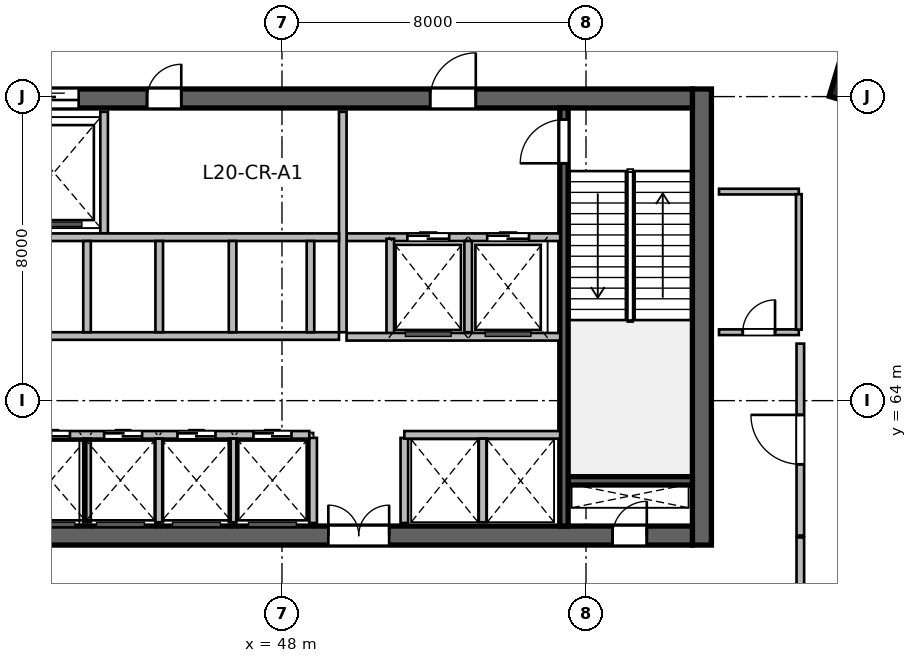
"""IFC4 building model, lengths in metres.
Left out: names, types, materials, properties, quantities, classifications, styles, units other than length and angle.
Written with IfcOpenShell. Run it as: python <this file> out.ifc"""

import sys

from ifc_helpers import new_model, si_unit, direction, frame, frame_2d, origin, origin_2d, place, context, subcontext, project, spatial, rectangle, extrude, source, transform, mapped, element, fill, save


model = new_model("IFC4")
c1 = context("Model", 3, precision=1e-05, world=origin(), true_north=direction((0.0, 1.0)))
c2 = subcontext(c1, "Body", "Model", "MODEL_VIEW")
j1 = project(units=[si_unit("LENGTHUNIT", "METRE"), si_unit("PLANEANGLEUNIT", "RADIAN")], contexts=[c1])
p1 = place(None, origin())
s1 = spatial("IfcSite", under=j1, at=p1, CompositionType="ELEMENT")
p2 = place(p1, origin())
s2 = spatial("IfcBuilding", under=s1, at=p2, CompositionType="ELEMENT")
p3 = place(p2, frame((0.0, 0.0, 85.8)))
s3 = spatial("IfcBuildingStorey", under=s2, at=p3, CompositionType="ELEMENT", Elevation=85.8)
m1 = source(origin(), c2, "Body", "SweptSolid", [
    extrude(rectangle(XDim=12.0, YDim=0.5, at=frame_2d((6.0, 0.0))), origin(), (0.0, 0.0, 1.0), 5.4),
])
p4 = place(p3, frame((59.05, 60.2, 0.0), z_axis=(0.0, 0.0, 1.0), x_axis=(0.0, 1.0, 0.0)))
e1 = element("IfcWall", 1, at=p4, inside=s3, PredefinedType="SHEAR", context=c2, shape_type="MappedRepresentation", body=[
    mapped(m1, transform((0.0, 0.0, 0.0), scale=1.0)),
])
m2 = source(origin(), c2, "Body", "SweptSolid", [
    extrude(rectangle(XDim=21.6, YDim=0.5, at=frame_2d((10.8, 0.0))), origin(), (0.0, 0.0, 1.0), 5.4),
])
p5 = place(p3, frame((37.2, 60.45, 0.0), z_axis=(0.0, 0.0, 1.0), x_axis=(1.0, 0.0, 0.0)))
e2 = element("IfcWall", 2, at=p5, inside=s3, PredefinedType="SHEAR", context=c2, shape_type="MappedRepresentation", body=[
    mapped(m2, transform((0.0, 0.0, 0.0), scale=1.0)),
])
p6 = place(p5, frame((1.1, 0.0, 0.0)))
e3 = element("IfcOpeningElement", 3, at=p6, cuts=e2, PredefinedType="OPENING", context=c2, shape_type="SweptSolid", body=[
    extrude(rectangle(XDim=1.15, YDim=2.15, at=frame_2d((0.575, 1.075))), frame((0.0, 0.26, 0.0), z_axis=(0.0, -1.0, 0.0), x_axis=(1.0, 0.0, 0.0)), (0.0, 0.0, 1.0), 0.52),
])
p7 = place(p5, frame((19.5, 0.0, 0.0)))
e4 = element("IfcOpeningElement", 4, at=p7, cuts=e2, PredefinedType="OPENING", context=c2, shape_type="SweptSolid", body=[
    extrude(rectangle(XDim=0.9, YDim=2.1, at=frame_2d((0.45, 1.05))), frame((0.0, 0.26, 0.0), z_axis=(0.0, -1.0, 0.0), x_axis=(1.0, 0.0, 0.0)), (0.0, 0.0, 1.0), 0.52),
])
p8 = place(p5, frame((12.02, 0.0, 0.0)))
e5 = element("IfcOpeningElement", 5, at=p8, cuts=e2, PredefinedType="OPENING", context=c2, shape_type="SweptSolid", body=[
    extrude(rectangle(XDim=1.6, YDim=2.15, at=frame_2d((0.8, 1.075))), frame((0.0, 0.26, 0.0), z_axis=(0.0, -1.0, 0.0), x_axis=(1.0, 0.0, 0.0)), (0.0, 0.0, 1.0), 0.52),
])
p9 = place(p3, frame((37.2, 71.95, 0.0), z_axis=(0.0, 0.0, 1.0), x_axis=(1.0, 0.0, 0.0)))
e6 = element("IfcWall", 6, at=p9, inside=s3, PredefinedType="SHEAR", context=c2, shape_type="MappedRepresentation", body=[
    mapped(m2, transform((0.0, 0.0, 0.0), scale=1.0)),
])
p10 = place(p9, frame((1.2, 0.0, 0.0)))
e7 = element("IfcOpeningElement", 7, at=p10, cuts=e6, PredefinedType="OPENING", context=c2, shape_type="SweptSolid", body=[
    extrude(rectangle(XDim=0.9, YDim=2.1, at=frame_2d((0.45, 1.05))), frame((0.0, 0.26, 0.0), z_axis=(0.0, -1.0, 0.0), x_axis=(1.0, 0.0, 0.0)), (0.0, 0.0, 1.0), 0.52),
])
p11 = place(p9, frame((14.7, 0.0, 0.0)))
e8 = element("IfcOpeningElement", 8, at=p11, cuts=e6, PredefinedType="OPENING", context=c2, shape_type="SweptSolid", body=[
    extrude(rectangle(XDim=1.2, YDim=2.15, at=frame_2d((0.6, 1.075))), frame((0.0, 0.26, 0.0), z_axis=(0.0, -1.0, 0.0), x_axis=(1.0, 0.0, 0.0)), (0.0, 0.0, 1.0), 0.52),
])
p12 = place(p9, frame((4.15, 0.0, 0.0)))
e9 = element("IfcOpeningElement", 9, at=p12, cuts=e6, PredefinedType="OPENING", context=c2, shape_type="SweptSolid", body=[
    extrude(rectangle(XDim=1.3, YDim=2.15, at=frame_2d((0.65, 1.075))), frame((0.0, 0.26, 0.0), z_axis=(0.0, -1.0, 0.0), x_axis=(1.0, 0.0, 0.0)), (0.0, 0.0, 1.0), 0.52),
])
p13 = place(p9, frame((7.25, 0.0, 0.0)))
e10 = element("IfcOpeningElement", 10, at=p13, cuts=e6, PredefinedType="OPENING", context=c2, shape_type="SweptSolid", body=[
    extrude(rectangle(XDim=0.9, YDim=2.1, at=frame_2d((0.45, 1.05))), frame((0.0, 0.26, 0.0), z_axis=(0.0, -1.0, 0.0), x_axis=(1.0, 0.0, 0.0)), (0.0, 0.0, 1.0), 0.52),
])
m3 = source(origin(), c2, "Body", "SweptSolid", [
    extrude(rectangle(XDim=3.27, YDim=0.22, at=frame_2d((1.635, 0.0))), origin(), (0.0, 0.0, 1.0), 5.4),
])
p14 = place(p3, frame((55.53, 61.89, 0.0), z_axis=(0.0, 0.0, 1.0), x_axis=(1.0, 0.0, 0.0)))
e11 = element("IfcWall", 11, at=p14, inside=s3, PredefinedType="SHEAR", context=c2, shape_type="MappedRepresentation", body=[
    mapped(m3, transform((0.0, 0.0, 0.0), scale=1.0)),
])
m4 = source(origin(), c2, "Body", "SweptSolid", [
    extrude(rectangle(XDim=11.0, YDim=0.22, at=frame_2d((5.5, 0.0))), origin(), (0.0, 0.0, 1.0), 5.4),
])
p15 = place(p3, frame((55.42, 60.7, 0.0), z_axis=(0.0, 0.0, 1.0), x_axis=(0.0, 1.0, 0.0)))
e12 = element("IfcWall", 12, at=p15, inside=s3, PredefinedType="SHEAR", context=c2, shape_type="MappedRepresentation", body=[
    mapped(m4, transform((0.0, 0.0, 0.0), scale=1.0)),
])
p16 = place(p15, frame((9.545, 0.0, 0.0)))
e13 = element("IfcOpeningElement", 13, at=p16, cuts=e12, PredefinedType="OPENING", context=c2, shape_type="SweptSolid", body=[
    extrude(rectangle(XDim=1.15, YDim=2.15, at=frame_2d((0.575, 1.075))), frame((0.0, 0.12, 0.0), z_axis=(0.0, -1.0, 0.0), x_axis=(1.0, 0.0, 0.0)), (0.0, 0.0, 1.0), 0.24),
])
m5 = source(origin(), c2, "Body", "SweptSolid", [
    extrude(rectangle(XDim=1.3, YDim=1.3, at=origin_2d()), origin(), (0.0, 0.0, 1.0), 5.4),
])
p17 = place(p3, frame((63.209, 72.442, 0.0), z_axis=(0.0, 0.0, 1.0), x_axis=(0.288697611798, 0.957420330337, 0.0)))
e14 = element("IfcColumn", 14, at=p17, inside=s3, PredefinedType="COLUMN", context=c2, shape_type="MappedRepresentation", body=[
    mapped(m5, transform((0.0, 0.0, 0.0), scale=1.0)),
])
m6 = source(origin(), c2, "Body", "SweptSolid", [
    extrude(rectangle(XDim=2.24, YDim=0.2, at=frame_2d((1.12, 0.0))), origin(), (0.0, 0.0, 1.0), 5.15),
])
for number, where, z_axis, x_axis in (
    (15, (48.82, 60.78, 0.0), (0.0, 0.0, 1.0), (0.0, 1.0, 0.0)),
    (16, (51.22, 60.78, 0.0), (0.0, 0.0, 1.0), (0.0, 1.0, 0.0)),
):
    element("IfcWall", number, at=place(p3, frame(where, z_axis=z_axis, x_axis=x_axis)), inside=s3, PredefinedType="SOLIDWALL", context=c2, shape_type="MappedRepresentation", body=[
        mapped(m6, transform((0.0, 0.0, 0.0), scale=1.0)),
    ])
m7 = source(origin(), c2, "Body", "SweptSolid", [
    extrude(rectangle(XDim=5.62, YDim=0.2, at=frame_2d((2.81, 0.0))), origin(), (0.0, 0.0, 1.0), 5.15),
])
p18 = place(p3, frame((49.7, 68.3, 0.0), z_axis=(0.0, 0.0, 1.0), x_axis=(1.0, 0.0, 0.0)))
e17 = element("IfcWall", 17, at=p18, inside=s3, PredefinedType="SOLIDWALL", context=c2, shape_type="MappedRepresentation", body=[
    mapped(m7, transform((0.0, 0.0, 0.0), scale=1.0)),
])
p19 = place(p18, frame((1.6, 0.0, 0.0)))
e18 = element("IfcOpeningElement", 18, at=p19, cuts=e17, PredefinedType="OPENING", context=c2, shape_type="SweptSolid", body=[
    extrude(rectangle(XDim=1.1, YDim=2.15, at=frame_2d((0.55, 1.075))), frame((0.0, 0.11, 0.0), z_axis=(0.0, -1.0, 0.0), x_axis=(1.0, 0.0, 0.0)), (0.0, 0.0, 1.0), 0.22),
])
p20 = place(p18, frame((3.7, 0.0, 0.0)))
e19 = element("IfcOpeningElement", 19, at=p20, cuts=e17, PredefinedType="OPENING", context=c2, shape_type="SweptSolid", body=[
    extrude(rectangle(XDim=1.1, YDim=2.15, at=frame_2d((0.55, 1.075))), frame((0.0, 0.11, 0.0), z_axis=(0.0, -1.0, 0.0), x_axis=(1.0, 0.0, 0.0)), (0.0, 0.0, 1.0), 0.22),
])
m8 = source(origin(), c2, "Body", "SweptSolid", [
    extrude(rectangle(XDim=5.8, YDim=0.2, at=frame_2d((2.9, 0.0))), origin(), (0.0, 0.0, 1.0), 5.15),
])
p21 = place(p3, frame((49.6, 65.8, 0.0), z_axis=(0.0, 0.0, 1.0), x_axis=(0.0, 1.0, 0.0)))
e20 = element("IfcWall", 20, at=p21, inside=s3, PredefinedType="SOLIDWALL", context=c2, shape_type="MappedRepresentation", body=[
    mapped(m8, transform((0.0, 0.0, 0.0), scale=1.0)),
])
m9 = source(origin(), c2, "Body", "SweptSolid", [
    extrude(rectangle(XDim=2.58, YDim=0.2, at=frame_2d((1.29, 0.0))), origin(), (0.0, 0.0, 1.0), 5.15),
])
p22 = place(p3, frame((50.85, 65.68, 0.0), z_axis=(0.0, 0.0, 1.0), x_axis=(0.0, 1.0, 0.0)))
e21 = element("IfcWall", 21, at=p22, inside=s3, PredefinedType="SOLIDWALL", context=c2, shape_type="MappedRepresentation", body=[
    mapped(m9, transform((0.0, 0.0, 0.0), scale=1.0)),
])
m10 = source(origin(), c2, "Body", "SweptSolid", [
    extrude(rectangle(XDim=2.4, YDim=0.2, at=frame_2d((1.2, 0.0))), origin(), (0.0, 0.0, 1.0), 5.15),
])
p23 = place(p3, frame((52.9, 65.8, 0.0), z_axis=(0.0, 0.0, 1.0), x_axis=(0.0, 1.0, 0.0)))
e22 = element("IfcWall", 22, at=p23, inside=s3, PredefinedType="SOLIDWALL", context=c2, shape_type="MappedRepresentation", body=[
    mapped(m10, transform((0.0, 0.0, 0.0), scale=1.0)),
])
p24 = place(p3, frame((49.7, 65.68, 0.0), z_axis=(0.0, 0.0, 1.0), x_axis=(1.0, 0.0, 0.0)))
e23 = element("IfcWall", 23, at=p24, inside=s3, PredefinedType="SOLIDWALL", context=c2, shape_type="MappedRepresentation", body=[
    mapped(m7, transform((0.0, 0.0, 0.0), scale=1.0)),
])
m11 = source(origin(), c2, "Body", "SweptSolid", [
    extrude(rectangle(XDim=3.2, YDim=0.2, at=frame_2d((1.6, 0.0))), origin(), (0.0, 0.0, 1.0), 5.15),
])
p25 = place(p3, frame((43.32, 68.4, 0.0), z_axis=(0.0, 0.0, 1.0), x_axis=(0.0, 1.0, 0.0)))
e24 = element("IfcWall", 24, at=p25, inside=s3, PredefinedType="SOLIDWALL", context=c2, shape_type="MappedRepresentation", body=[
    mapped(m11, transform((0.0, 0.0, 0.0), scale=1.0)),
])
m12 = source(origin(), c2, "Body", "SweptSolid", [
    extrude(rectangle(XDim=8.8, YDim=0.2, at=frame_2d((4.4, 0.0))), origin(), (0.0, 0.0, 1.0), 5.15),
])
p26 = place(p3, frame((40.7, 68.3, 0.0), z_axis=(0.0, 0.0, 1.0), x_axis=(1.0, 0.0, 0.0)))
e25 = element("IfcWall", 25, at=p26, inside=s3, PredefinedType="SOLIDWALL", context=c2, shape_type="MappedRepresentation", body=[
    mapped(m12, transform((0.0, 0.0, 0.0), scale=1.0)),
])
m13 = source(origin(), c2, "Body", "SweptSolid", [
    extrude(rectangle(XDim=8.02, YDim=0.2, at=frame_2d((4.01, 0.0))), origin(), (0.0, 0.0, 1.0), 5.15),
])
p27 = place(p3, frame((40.7, 63.1, 0.0), z_axis=(0.0, 0.0, 1.0), x_axis=(1.0, 0.0, 0.0)))
e26 = element("IfcWall", 26, at=p27, inside=s3, PredefinedType="SOLIDWALL", context=c2, shape_type="MappedRepresentation", body=[
    mapped(m13, transform((0.0, 0.0, 0.0), scale=1.0)),
])
p28 = place(p27, frame((0.72, 0.0, 0.0)))
e27 = element("IfcOpeningElement", 27, at=p28, cuts=e26, PredefinedType="OPENING", context=c2, shape_type="SweptSolid", body=[
    extrude(rectangle(XDim=1.0, YDim=2.15, at=frame_2d((0.5, 1.075))), frame((0.0, 0.11, 0.0), z_axis=(0.0, -1.0, 0.0), x_axis=(1.0, 0.0, 0.0)), (0.0, 0.0, 1.0), 0.22),
])
p29 = place(p27, frame((2.62, 0.0, 0.0)))
e28 = element("IfcOpeningElement", 28, at=p29, cuts=e26, PredefinedType="OPENING", context=c2, shape_type="SweptSolid", body=[
    extrude(rectangle(XDim=1.0, YDim=2.15, at=frame_2d((0.5, 1.075))), frame((0.0, 0.11, 0.0), z_axis=(0.0, -1.0, 0.0), x_axis=(1.0, 0.0, 0.0)), (0.0, 0.0, 1.0), 0.22),
])
p30 = place(p27, frame((4.55, 0.0, 0.0)))
e29 = element("IfcOpeningElement", 29, at=p30, cuts=e26, PredefinedType="OPENING", context=c2, shape_type="SweptSolid", body=[
    extrude(rectangle(XDim=1.0, YDim=2.15, at=frame_2d((0.5, 1.075))), frame((0.0, 0.11, 0.0), z_axis=(0.0, -1.0, 0.0), x_axis=(1.0, 0.0, 0.0)), (0.0, 0.0, 1.0), 0.22),
])
p31 = place(p27, frame((6.55, 0.0, 0.0)))
e30 = element("IfcOpeningElement", 30, at=p31, cuts=e26, PredefinedType="OPENING", context=c2, shape_type="SweptSolid", body=[
    extrude(rectangle(XDim=1.0, YDim=2.15, at=frame_2d((0.5, 1.075))), frame((0.0, 0.11, 0.0), z_axis=(0.0, -1.0, 0.0), x_axis=(1.0, 0.0, 0.0)), (0.0, 0.0, 1.0), 0.22),
])
m14 = source(origin(), c2, "Body", "SweptSolid", [
    extrude(rectangle(XDim=4.1, YDim=0.2, at=frame_2d((2.05, 0.0))), origin(), (0.0, 0.0, 1.0), 5.15),
])
p32 = place(p3, frame((51.22, 63.1, 0.0), z_axis=(0.0, 0.0, 1.0), x_axis=(1.0, 0.0, 0.0)))
e31 = element("IfcWall", 31, at=p32, inside=s3, PredefinedType="SOLIDWALL", context=c2, shape_type="MappedRepresentation", body=[
    mapped(m14, transform((0.0, 0.0, 0.0), scale=1.0)),
])
m15 = source(origin(), c2, "Body", "SweptSolid", [
    extrude(rectangle(XDim=2.2, YDim=0.2, at=frame_2d((1.1, 0.0))), origin(), (0.0, 0.0, 1.0), 5.15),
])
for number, where, z_axis, x_axis in (
    (32, (42.87, 60.8, 0.0), (0.0, 0.0, 1.0), (0.0, 1.0, 0.0)),
    (33, (44.77, 60.8, 0.0), (0.0, 0.0, 1.0), (0.0, 1.0, 0.0)),
    (34, (46.7, 60.8, 0.0), (0.0, 0.0, 1.0), (0.0, 1.0, 0.0)),
    (35, (53.28, 60.8, 0.0), (0.0, 0.0, 1.0), (0.0, 1.0, 0.0)),
):
    element("IfcWall", number, at=place(p3, frame(where, z_axis=z_axis, x_axis=x_axis)), inside=s3, PredefinedType="SOLIDWALL", context=c2, shape_type="MappedRepresentation", body=[
        mapped(m15, transform((0.0, 0.0, 0.0), scale=1.0)),
    ])
p33 = place(p3, frame((40.7, 65.7, 0.0), z_axis=(0.0, 0.0, 1.0), x_axis=(1.0, 0.0, 0.0)))
e36 = element("IfcWall", 36, at=p33, inside=s3, PredefinedType="SOLIDWALL", context=c2, shape_type="MappedRepresentation", body=[
    mapped(m12, transform((0.0, 0.0, 0.0), scale=1.0)),
])
for number, where, z_axis, x_axis in (
    (37, (48.75, 65.8, 0.0), (0.0, 0.0, 1.0), (0.0, 1.0, 0.0)),
    (38, (42.87, 65.8, 0.0), (0.0, 0.0, 1.0), (0.0, 1.0, 0.0)),
    (39, (44.77, 65.8, 0.0), (0.0, 0.0, 1.0), (0.0, 1.0, 0.0)),
    (40, (46.7, 65.8, 0.0), (0.0, 0.0, 1.0), (0.0, 1.0, 0.0)),
):
    element("IfcWall", number, at=place(p3, frame(where, z_axis=z_axis, x_axis=x_axis)), inside=s3, PredefinedType="SOLIDWALL", context=c2, shape_type="MappedRepresentation", body=[
        mapped(m10, transform((0.0, 0.0, 0.0), scale=1.0)),
    ])
m16 = source(origin(), c2, "Body", "SweptSolid", [
    extrude(rectangle(XDim=2.1, YDim=0.15, at=frame_2d((1.05, 0.0))), origin(), (0.0, 0.0, 1.0), 5.15),
])
p34 = place(p3, frame((59.5, 65.8, 0.0), z_axis=(0.0, 0.0, 1.0), x_axis=(1.0, 0.0, 0.0)))
e41 = element("IfcWall", 41, at=p34, inside=s3, PredefinedType="PARTITIONING", context=c2, shape_type="MappedRepresentation", body=[
    mapped(m16, transform((0.0, 0.0, 0.0), scale=1.0)),
])
p35 = place(p34, frame((0.625, 0.0, 0.0)))
e42 = element("IfcOpeningElement", 42, at=p35, cuts=e41, PredefinedType="OPENING", context=c2, shape_type="SweptSolid", body=[
    extrude(rectangle(XDim=0.85, YDim=2.1, at=frame_2d((0.425, 1.05))), frame((0.0, 0.085, 0.0), z_axis=(0.0, -1.0, 0.0), x_axis=(1.0, 0.0, 0.0)), (0.0, 0.0, 1.0), 0.17),
])
p36 = place(p3, frame((59.5, 69.5, 0.0), z_axis=(0.0, 0.0, 1.0), x_axis=(1.0, 0.0, 0.0)))
e43 = element("IfcWall", 43, at=p36, inside=s3, PredefinedType="PARTITIONING", context=c2, shape_type="MappedRepresentation", body=[
    mapped(m16, transform((0.0, 0.0, 0.0), scale=1.0)),
])
m17 = source(origin(), c2, "Body", "SweptSolid", [
    extrude(rectangle(XDim=3.565, YDim=0.15, at=frame_2d((1.783, 0.0))), origin(), (0.0, 0.0, 1.0), 5.15),
])
p37 = place(p3, frame((61.6, 65.867, 0.0), z_axis=(0.0, 0.0, 1.0), x_axis=(0.0, 1.0, 0.0)))
e44 = element("IfcWall", 44, at=p37, inside=s3, PredefinedType="PARTITIONING", context=c2, shape_type="MappedRepresentation", body=[
    mapped(m17, transform((0.0, 0.0, 0.0), scale=1.0)),
])
m18 = source(origin(), c2, "Body", "SweptSolid", [
    extrude(rectangle(XDim=13.689, YDim=0.2, at=frame_2d((6.844, 0.0))), origin(), (0.0, 0.0, 1.0), 4.434),
])
p38 = place(p3, frame((61.64, 46.711, 0.0), z_axis=(0.0, 0.0, 1.0), x_axis=(0.0, 1.0, 0.0)))
e45 = element("IfcWall", 45, at=p38, inside=s3, PredefinedType="SOLIDWALL", context=c2, shape_type="MappedRepresentation", body=[
    mapped(m18, transform((0.0, 0.0, 0.0), scale=1.0)),
])
m19 = source(origin(), c2, "Body", "SweptSolid", [
    extrude(rectangle(XDim=5.05, YDim=0.2, at=frame_2d((2.525, 0.0))), origin(), (0.0, 0.0, 1.0), 5.15),
])
p39 = place(p3, frame((61.64, 60.45, 0.0), z_axis=(0.0, 0.0, 1.0), x_axis=(0.0, 1.0, 0.0)))
e46 = element("IfcWall", 46, at=p39, inside=s3, PredefinedType="SOLIDWALL", context=c2, shape_type="MappedRepresentation", body=[
    mapped(m19, transform((0.0, 0.0, 0.0), scale=1.0)),
])
p40 = place(p39, frame((1.875, 0.0, 0.0)))
e47 = element("IfcOpeningElement", 47, at=p40, cuts=e46, PredefinedType="OPENING", context=c2, shape_type="SweptSolid", body=[
    extrude(rectangle(XDim=1.3, YDim=2.15, at=frame_2d((0.65, 1.075))), frame((0.0, 0.11, 0.0), z_axis=(0.0, -1.0, 0.0), x_axis=(1.0, 0.0, 0.0)), (0.0, 0.0, 1.0), 0.22),
])
m20 = source(origin(), c2, "Body", "SweptSolid", [
    extrude(rectangle(XDim=0.9, YDim=2.1, at=frame_2d((0.45, 1.05))), frame((0.0, 0.025, 0.0), z_axis=(0.0, -1.0, 0.0), x_axis=(1.0, 0.0, 0.0)), (0.0, 0.0, 1.0), 0.05),
])
p41 = place(p7, origin())
e48 = element("IfcDoor", 48, at=p41, inside=s3, OperationType="SINGLE_SWING_RIGHT", PredefinedType="DOOR", context=c2, shape_type="MappedRepresentation", body=[
    mapped(m20, transform((0.0, 0.0, 0.0), scale=1.0)),
])
fill(e4, e48)
m21 = source(origin(), c2, "Body", "SweptSolid", [
    extrude(rectangle(XDim=1.15, YDim=2.15, at=frame_2d((0.575, 1.075))), frame((0.0, 0.025, 0.0), z_axis=(0.0, -1.0, 0.0), x_axis=(1.0, 0.0, 0.0)), (0.0, 0.0, 1.0), 0.05),
])
p42 = place(p16, origin())
e49 = element("IfcDoor", 49, at=p42, inside=s3, OperationType="SINGLE_SWING_LEFT", PredefinedType="DOOR", context=c2, shape_type="MappedRepresentation", body=[
    mapped(m21, transform((0.0, 0.0, 0.0), scale=1.0)),
])
fill(e13, e49)
m22 = source(origin(), c2, "Body", "SweptSolid", [
    extrude(rectangle(XDim=1.6, YDim=2.15, at=frame_2d((0.8, 1.075))), frame((0.0, 0.025, 0.0), z_axis=(0.0, -1.0, 0.0), x_axis=(1.0, 0.0, 0.0)), (0.0, 0.0, 1.0), 0.05),
])
p43 = place(p8, origin())
e50 = element("IfcDoor", 50, at=p43, inside=s3, OperationType="DOUBLE_DOOR_SINGLE_SWING", PredefinedType="DOOR", context=c2, shape_type="MappedRepresentation", body=[
    mapped(m22, transform((0.0, 0.0, 0.0), scale=1.0)),
])
fill(e5, e50)
m23 = source(origin(), c2, "Body", "SweptSolid", [
    extrude(rectangle(XDim=1.2, YDim=2.15, at=frame_2d((0.6, 1.075))), frame((0.0, 0.025, 0.0), z_axis=(0.0, -1.0, 0.0), x_axis=(1.0, 0.0, 0.0)), (0.0, 0.0, 1.0), 0.05),
])
p44 = place(p11, origin())
e51 = element("IfcDoor", 51, at=p44, inside=s3, OperationType="SINGLE_SWING_RIGHT", PredefinedType="DOOR", context=c2, shape_type="MappedRepresentation", body=[
    mapped(m23, transform((0.0, 0.0, 0.0), scale=1.0)),
])
fill(e8, e51)
m24 = source(origin(), c2, "Body", "SweptSolid", [
    extrude(rectangle(XDim=1.1, YDim=2.15, at=frame_2d((0.55, 1.075))), frame((0.0, 0.025, 0.0), z_axis=(0.0, -1.0, 0.0), x_axis=(1.0, 0.0, 0.0)), (0.0, 0.0, 1.0), 0.05),
])
p45 = place(p19, origin())
e52 = element("IfcDoor", 52, at=p45, inside=s3, OperationType="DOUBLE_DOOR_SLIDING", PredefinedType="DOOR", context=c2, shape_type="MappedRepresentation", body=[
    mapped(m24, transform((0.0, 0.0, 0.0), scale=1.0)),
])
fill(e18, e52)
p46 = place(p20, origin())
e53 = element("IfcDoor", 53, at=p46, inside=s3, OperationType="DOUBLE_DOOR_SLIDING", PredefinedType="DOOR", context=c2, shape_type="MappedRepresentation", body=[
    mapped(m24, transform((0.0, 0.0, 0.0), scale=1.0)),
])
fill(e19, e53)
m25 = source(origin(), c2, "Body", "SweptSolid", [
    extrude(rectangle(XDim=1.3, YDim=2.15, at=frame_2d((0.65, 1.075))), frame((0.0, 0.025, 0.0), z_axis=(0.0, -1.0, 0.0), x_axis=(1.0, 0.0, 0.0)), (0.0, 0.0, 1.0), 0.05),
])
p47 = place(p12, origin())
e54 = element("IfcDoor", 54, at=p47, inside=s3, OperationType="DOUBLE_DOOR_SLIDING", PredefinedType="DOOR", context=c2, shape_type="MappedRepresentation", body=[
    mapped(m25, transform((0.0, 0.0, 0.0), scale=1.0)),
])
fill(e9, e54)
p48 = place(p13, origin())
e55 = element("IfcDoor", 55, at=p48, inside=s3, OperationType="SINGLE_SWING_RIGHT", PredefinedType="DOOR", context=c2, shape_type="MappedRepresentation", body=[
    mapped(m20, transform((0.0, 0.0, 0.0), scale=1.0)),
])
fill(e10, e55)
m26 = source(origin(), c2, "Body", "SweptSolid", [
    extrude(rectangle(XDim=1.0, YDim=2.15, at=frame_2d((0.5, 1.075))), frame((0.0, 0.025, 0.0), z_axis=(0.0, -1.0, 0.0), x_axis=(1.0, 0.0, 0.0)), (0.0, 0.0, 1.0), 0.05),
])
p49 = place(p28, origin())
e56 = element("IfcDoor", 56, at=p49, inside=s3, OperationType="DOUBLE_DOOR_SLIDING", PredefinedType="DOOR", context=c2, shape_type="MappedRepresentation", body=[
    mapped(m26, transform((0.0, 0.0, 0.0), scale=1.0)),
])
fill(e27, e56)
p50 = place(p29, origin())
e57 = element("IfcDoor", 57, at=p50, inside=s3, OperationType="DOUBLE_DOOR_SLIDING", PredefinedType="DOOR", context=c2, shape_type="MappedRepresentation", body=[
    mapped(m26, transform((0.0, 0.0, 0.0), scale=1.0)),
])
fill(e28, e57)
p51 = place(p30, origin())
e58 = element("IfcDoor", 58, at=p51, inside=s3, OperationType="DOUBLE_DOOR_SLIDING", PredefinedType="DOOR", context=c2, shape_type="MappedRepresentation", body=[
    mapped(m26, transform((0.0, 0.0, 0.0), scale=1.0)),
])
fill(e29, e58)
p52 = place(p31, origin())
e59 = element("IfcDoor", 59, at=p52, inside=s3, OperationType="DOUBLE_DOOR_SLIDING", PredefinedType="DOOR", context=c2, shape_type="MappedRepresentation", body=[
    mapped(m26, transform((0.0, 0.0, 0.0), scale=1.0)),
])
fill(e30, e59)
m27 = source(origin(), c2, "Body", "SweptSolid", [
    extrude(rectangle(XDim=0.85, YDim=2.1, at=frame_2d((0.425, 1.05))), frame((0.0, 0.025, 0.0), z_axis=(0.0, -1.0, 0.0), x_axis=(1.0, 0.0, 0.0)), (0.0, 0.0, 1.0), 0.05),
])
p53 = place(p35, origin())
e60 = element("IfcDoor", 60, at=p53, inside=s3, OperationType="SINGLE_SWING_RIGHT", PredefinedType="DOOR", context=c2, shape_type="MappedRepresentation", body=[
    mapped(m27, transform((0.0, 0.0, 0.0), scale=1.0)),
])
fill(e42, e60)
m28 = source(origin(), c2, "Body", "SweptSolid", [
    extrude(rectangle(XDim=1.3, YDim=2.15, at=frame_2d((0.65, 1.075))), frame((0.0, 0.025, 0.0), z_axis=(0.0, -1.0, 0.0), x_axis=(1.0, 0.0, 0.0)), (0.0, 0.0, 1.0), 0.05),
])
p54 = place(p40, origin())
e61 = element("IfcDoor", 61, at=p54, inside=s3, OperationType="SINGLE_SWING_RIGHT", PredefinedType="DOOR", context=c2, shape_type="MappedRepresentation", body=[
    mapped(m28, transform((0.0, 0.0, 0.0), scale=1.0)),
])
fill(e47, e61)
save(model, sys.argv[1])
